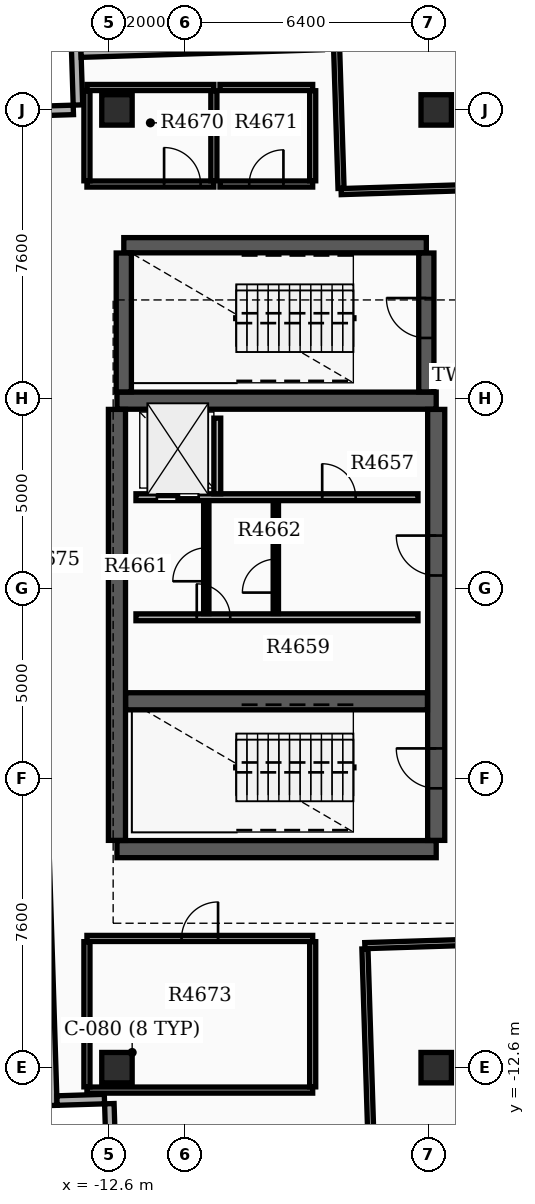
"""IFC4 building model, lengths in metres.
Left out: names, types, materials, properties, quantities, classifications, styles, units other than length and angle.
Written with IfcOpenShell. Run it as: python <this file> out.ifc"""

import sys

from ifc_helpers import new_model, si_unit, direction, frame, frame_2d, origin, origin_2d, place, context, subcontext, project, spatial, rectangle, extrude, element, fill, save


model = new_model("IFC4")
c1 = context("Model", 3, precision=1e-05, world=origin(), true_north=direction((0.0, 1.0)))
c2 = subcontext(c1, "Body", "Model", "MODEL_VIEW")
j1 = project(units=[si_unit("LENGTHUNIT", "METRE"), si_unit("PLANEANGLEUNIT", "RADIAN")], contexts=[c1])
p1 = place(None, origin())
s1 = spatial("IfcSite", under=j1, at=p1, CompositionType="ELEMENT")
p2 = place(p1, origin())
s2 = spatial("IfcBuilding", under=s1, at=p2, CompositionType="ELEMENT")
p3 = place(p2, frame((0.0, 0.0, 299.4)))
s3 = spatial("IfcBuildingStorey", under=s2, at=p3, CompositionType="ELEMENT", Elevation=299.4)
for number, where, z_axis, x_axis in (
    (1, (-12.4, -6.85, 0.0), (0.0, 0.0, 1.0), (1.0, 0.0, 0.0)),
    (2, (-12.4, 4.95, 0.0), (0.0, 0.0, 1.0), (1.0, 0.0, 0.0)),
):
    element("IfcWall", number, at=place(p3, frame(where, z_axis=z_axis, x_axis=x_axis)), inside=s3, PredefinedType="SHEAR", context=c2, shape_type="SweptSolid", body=[
        extrude(rectangle(XDim=8.4, YDim=0.45, at=frame_2d((4.2, 0.0))), origin(), (0.0, 0.0, 1.0), 4.25),
    ])
p4 = place(p3, frame((-12.4, -6.62, 0.0), z_axis=(0.0, 0.0, 1.0), x_axis=(0.0, 1.0, 0.0)))
e3 = element("IfcWall", 3, at=p4, inside=s3, PredefinedType="SHEAR", context=c2, shape_type="SweptSolid", body=[
    extrude(rectangle(XDim=11.34, YDim=0.45, at=frame_2d((5.67, 0.0))), origin(), (0.0, 0.0, 1.0), 4.25),
])
p5 = place(p3, frame((-4.0, -6.62, 0.0), z_axis=(0.0, 0.0, 1.0), x_axis=(0.0, 1.0, 0.0)))
e4 = element("IfcWall", 4, at=p5, inside=s3, PredefinedType="SHEAR", context=c2, shape_type="SweptSolid", body=[
    extrude(rectangle(XDim=11.34, YDim=0.45, at=frame_2d((5.67, 0.0))), origin(), (0.0, 0.0, 1.0), 4.25),
])
p6 = place(p5, frame((1.37, 0.0, 0.0)))
e5 = element("IfcOpeningElement", 5, at=p6, cuts=e4, PredefinedType="OPENING", context=c2, shape_type="SweptSolid", body=[
    extrude(rectangle(XDim=1.05, YDim=2.15, at=frame_2d((0.525, 1.075))), frame((0.0, 0.235, 0.0), z_axis=(0.0, -1.0, 0.0), x_axis=(1.0, 0.0, 0.0)), (0.0, 0.0, 1.0), 0.47),
])
p7 = place(p5, frame((6.97, 0.0, 0.0)))
e6 = element("IfcOpeningElement", 6, at=p7, cuts=e4, PredefinedType="OPENING", context=c2, shape_type="SweptSolid", body=[
    extrude(rectangle(XDim=1.05, YDim=2.15, at=frame_2d((0.525, 1.075))), frame((0.0, 0.235, 0.0), z_axis=(0.0, -1.0, 0.0), x_axis=(1.0, 0.0, 0.0)), (0.0, 0.0, 1.0), 0.47),
])
p8 = place(p3, frame((-12.17, -2.96, 0.0), z_axis=(0.0, 0.0, 1.0), x_axis=(1.0, 0.0, 0.0)))
e7 = element("IfcWall", 7, at=p8, inside=s3, PredefinedType="SHEAR", context=c2, shape_type="SweptSolid", body=[
    extrude(rectangle(XDim=7.94, YDim=0.45, at=frame_2d((3.97, 0.0))), origin(), (0.0, 0.0, 1.0), 4.25),
])
p9 = place(p3, frame((-12.22, 9.04, 0.0), z_axis=(0.0, 0.0, 1.0), x_axis=(1.0, 0.0, 0.0)))
e8 = element("IfcWall", 8, at=p9, inside=s3, PredefinedType="SHEAR", context=c2, shape_type="SweptSolid", body=[
    extrude(rectangle(XDim=7.96, YDim=0.4, at=frame_2d((3.98, 0.0))), origin(), (0.0, 0.0, 1.0), 4.25),
])
p10 = place(p3, frame((-12.22, 5.18, 0.0), z_axis=(0.0, 0.0, 1.0), x_axis=(0.0, 1.0, 0.0)))
e9 = element("IfcWall", 9, at=p10, inside=s3, PredefinedType="SHEAR", context=c2, shape_type="SweptSolid", body=[
    extrude(rectangle(XDim=3.655, YDim=0.4, at=frame_2d((1.828, 0.0))), origin(), (0.0, 0.0, 1.0), 4.25),
])
p11 = place(p3, frame((-4.26, 5.18, 0.0), z_axis=(0.0, 0.0, 1.0), x_axis=(0.0, 1.0, 0.0)))
e10 = element("IfcWall", 10, at=p11, inside=s3, PredefinedType="SHEAR", context=c2, shape_type="SweptSolid", body=[
    extrude(rectangle(XDim=3.655, YDim=0.4, at=frame_2d((1.828, 0.0))), origin(), (0.0, 0.0, 1.0), 4.25),
])
p12 = place(p11, frame((1.42, 0.0, 0.0)))
e11 = element("IfcOpeningElement", 11, at=p12, cuts=e10, PredefinedType="OPENING", context=c2, shape_type="SweptSolid", body=[
    extrude(rectangle(XDim=1.05, YDim=2.15, at=frame_2d((0.525, 1.075))), frame((0.0, 0.21, 0.0), z_axis=(0.0, -1.0, 0.0), x_axis=(1.0, 0.0, 0.0)), (0.0, 0.0, 1.0), 0.42),
])
for number, where, z_axis, x_axis in (
    (12, (-12.4, -12.6, 0.0), (0.0, 0.0, 1.0), (1.0, 0.0, 0.0)),
    (13, (-12.4, 12.6, 0.0), (0.0, 0.0, 1.0), (1.0, 0.0, 0.0)),
    (14, (-4.0, -12.6, 0.0), (0.0, 0.0, 1.0), (1.0, 0.0, 0.0)),
    (15, (-4.0, 12.6, 0.0), (0.0, 0.0, 1.0), (1.0, 0.0, 0.0)),
):
    element("IfcColumn", number, at=place(p3, frame(where, z_axis=z_axis, x_axis=x_axis)), inside=s3, PredefinedType="COLUMN", context=c2, shape_type="SweptSolid", body=[
        extrude(rectangle(XDim=0.8, YDim=0.8, at=origin_2d()), origin(), (0.0, 0.0, 1.0), 4.5),
    ])
p13 = place(p3, frame((-14.797, 12.561, 0.0), z_axis=(0.0, 0.0, 1.0), x_axis=(0.999505383482, 0.0314481858, 0.0)))
e16 = element("IfcWall", 16, at=p13, inside=s3, PredefinedType="STANDARD", context=c2, shape_type="SweptSolid", body=[
    extrude(rectangle(XDim=1.25, YDim=0.25, at=frame_2d((0.625, 0.0))), origin(), (0.0, 0.0, 1.0), 3.73),
])
p14 = place(p3, frame((-13.427, 12.729, 0.0), z_axis=(0.0, 0.0, 1.0), x_axis=(-0.031412596484, 0.999506502621, 0.0)))
e17 = element("IfcWall", 17, at=p14, inside=s3, PredefinedType="STANDARD", context=c2, shape_type="SweptSolid", body=[
    extrude(rectangle(XDim=1.5, YDim=0.25, at=frame_2d((0.75, 0.0))), origin(), (0.0, 0.0, 1.0), 3.73),
])
p15 = place(p3, frame((-13.345, 14.108, 0.0), z_axis=(0.0, 0.0, 1.0), x_axis=(0.999506546651, 0.031411195469, 0.0)))
e18 = element("IfcWall", 18, at=p15, inside=s3, PredefinedType="STANDARD", context=c2, shape_type="SweptSolid", body=[
    extrude(rectangle(XDim=6.35, YDim=0.25, at=frame_2d((3.175, 0.0))), origin(), (0.0, 0.0, 1.0), 3.73),
])
p16 = place(p3, frame((-14.315, -6.748, 0.0), z_axis=(0.0, 0.0, 1.0), x_axis=(0.03143615455, -0.999505761958, 0.0)))
e19 = element("IfcWall", 19, at=p16, inside=s3, PredefinedType="STANDARD", context=c2, shape_type="SweptSolid", body=[
    extrude(rectangle(XDim=6.85, YDim=0.25, at=frame_2d((3.425, 0.0))), origin(), (0.0, 0.0, 1.0), 3.73),
])
p17 = place(p3, frame((-13.979, -13.466, 0.0), z_axis=(0.0, 0.0, 1.0), x_axis=(0.999505576605, 0.031442047252, 0.0)))
e20 = element("IfcWall", 20, at=p17, inside=s3, PredefinedType="STANDARD", context=c2, shape_type="SweptSolid", body=[
    extrude(rectangle(XDim=1.25, YDim=0.25, at=frame_2d((0.625, 0.0))), origin(), (0.0, 0.0, 1.0), 3.73),
])
p18 = place(p3, frame((-12.601, -13.548, 0.0), z_axis=(0.0, 0.0, 1.0), x_axis=(0.031255080879, -0.999511440614, 0.0)))
e21 = element("IfcWall", 21, at=p18, inside=s3, PredefinedType="STANDARD", context=c2, shape_type="SweptSolid", body=[
    extrude(rectangle(XDim=1.5, YDim=0.25, at=frame_2d((0.75, 0.0))), origin(), (0.0, 0.0, 1.0), 3.73),
])
p19 = place(p3, frame((-11.9, 2.41, 0.0), z_axis=(0.0, 0.0, 1.0), x_axis=(1.0, 0.0, 0.0)))
e22 = element("IfcWall", 22, at=p19, inside=s3, PredefinedType="SOLIDWALL", context=c2, shape_type="SweptSolid", body=[
    extrude(rectangle(XDim=7.42, YDim=0.18, at=frame_2d((3.71, 0.0))), origin(), (0.0, 0.0, 1.0), 3.72),
])
p20 = place(p19, frame((0.55, 0.0, 0.0)))
e23 = element("IfcOpeningElement", 23, at=p20, cuts=e22, PredefinedType="OPENING", context=c2, shape_type="SweptSolid", body=[
    extrude(rectangle(XDim=1.1, YDim=2.15, at=frame_2d((0.55, 1.075))), frame((0.0, 0.1, 0.0), z_axis=(0.0, -1.0, 0.0), x_axis=(1.0, 0.0, 0.0)), (0.0, 0.0, 1.0), 0.2),
])
p21 = place(p19, frame((4.9, 0.0, 0.0)))
e24 = element("IfcOpeningElement", 24, at=p21, cuts=e22, PredefinedType="OPENING", context=c2, shape_type="SweptSolid", body=[
    extrude(rectangle(XDim=0.88, YDim=2.1, at=frame_2d((0.44, 1.05))), frame((0.0, 0.1, 0.0), z_axis=(0.0, -1.0, 0.0), x_axis=(1.0, 0.0, 0.0)), (0.0, 0.0, 1.0), 0.2),
])
p22 = place(p3, frame((-11.9, -0.75, 0.0), z_axis=(0.0, 0.0, 1.0), x_axis=(1.0, 0.0, 0.0)))
e25 = element("IfcWall", 25, at=p22, inside=s3, PredefinedType="SOLIDWALL", context=c2, shape_type="SweptSolid", body=[
    extrude(rectangle(XDim=7.42, YDim=0.18, at=frame_2d((3.71, 0.0))), origin(), (0.0, 0.0, 1.0), 3.72),
])
p23 = place(p22, frame((1.6, 0.0, 0.0)))
e26 = element("IfcOpeningElement", 26, at=p23, cuts=e25, PredefinedType="OPENING", context=c2, shape_type="SweptSolid", body=[
    extrude(rectangle(XDim=0.88, YDim=2.1, at=frame_2d((0.44, 1.05))), frame((0.0, 0.1, 0.0), z_axis=(0.0, -1.0, 0.0), x_axis=(1.0, 0.0, 0.0)), (0.0, 0.0, 1.0), 0.2),
])
p24 = place(p3, frame((-9.76, 2.5, 0.0), z_axis=(0.0, 0.0, 1.0), x_axis=(0.0, 1.0, 0.0)))
e27 = element("IfcWall", 27, at=p24, inside=s3, PredefinedType="SOLIDWALL", context=c2, shape_type="SweptSolid", body=[
    extrude(rectangle(XDim=1.99, YDim=0.18, at=frame_2d((0.995, 0.0))), origin(), (0.0, 0.0, 1.0), 3.72),
])
p25 = place(p3, frame((-8.22, -0.65, 0.0), z_axis=(0.0, 0.0, 1.0), x_axis=(0.0, 1.0, 0.0)))
e28 = element("IfcWall", 28, at=p25, inside=s3, PredefinedType="SOLIDWALL", context=c2, shape_type="SweptSolid", body=[
    extrude(rectangle(XDim=2.96, YDim=0.14, at=frame_2d((1.48, 0.0))), origin(), (0.0, 0.0, 1.0), 3.72),
])
p26 = place(p25, frame((0.55, 0.0, 0.0)))
e29 = element("IfcOpeningElement", 29, at=p26, cuts=e28, PredefinedType="OPENING", context=c2, shape_type="SweptSolid", body=[
    extrude(rectangle(XDim=0.88, YDim=2.1, at=frame_2d((0.44, 1.05))), frame((0.0, 0.08, 0.0), z_axis=(0.0, -1.0, 0.0), x_axis=(1.0, 0.0, 0.0)), (0.0, 0.0, 1.0), 0.16),
])
p27 = place(p3, frame((-10.05, -0.652, 0.0), z_axis=(0.0, 0.0, 1.0), x_axis=(0.0, 1.0, 0.0)))
e30 = element("IfcWall", 30, at=p27, inside=s3, PredefinedType="PARTITIONING", context=c2, shape_type="SweptSolid", body=[
    extrude(rectangle(XDim=2.962, YDim=0.14, at=frame_2d((1.481, 0.0))), origin(), (0.0, 0.0, 1.0), 3.72),
])
p28 = place(p27, frame((0.85, 0.0, 0.0)))
e31 = element("IfcOpeningElement", 31, at=p28, cuts=e30, PredefinedType="OPENING", context=c2, shape_type="SweptSolid", body=[
    extrude(rectangle(XDim=0.88, YDim=2.1, at=frame_2d((0.44, 1.05))), frame((0.0, 0.08, 0.0), z_axis=(0.0, -1.0, 0.0), x_axis=(1.0, 0.0, 0.0)), (0.0, 0.0, 1.0), 0.16),
])
p29 = place(p3, frame((-6.501, 10.451, 0.0), z_axis=(0.0, 0.0, 1.0), x_axis=(0.999506967101, 0.031397813872, 0.0)))
e32 = element("IfcWall", 32, at=p29, inside=s3, PredefinedType="PARTITIONING", context=c2, shape_type="SweptSolid", body=[
    extrude(rectangle(XDim=12.34, YDim=0.16, at=frame_2d((6.17, 0.0))), origin(), (0.0, 0.0, 1.0), 3.72),
])
p30 = place(p29, frame((5.42, 0.0, 0.0)))
e33 = element("IfcOpeningElement", 33, at=p30, cuts=e32, PredefinedType="OPENING", context=c2, shape_type="SweptSolid", body=[
    extrude(rectangle(XDim=1.5, YDim=2.15, at=frame_2d((0.75, 1.075))), frame((0.0, 0.09, 0.0), z_axis=(0.0, -1.0, 0.0), x_axis=(1.0, 0.0, 0.0)), (0.0, 0.0, 1.0), 0.18),
])
p31 = place(p3, frame((-6.504, 10.536, 0.0), z_axis=(0.0, 0.0, 1.0), x_axis=(-0.031414008392, 0.999506458247, 0.0)))
e34 = element("IfcWall", 34, at=p31, inside=s3, PredefinedType="PARTITIONING", context=c2, shape_type="SweptSolid", body=[
    extrude(rectangle(XDim=14.712, YDim=0.16, at=frame_2d((7.356, 0.0))), origin(), (0.0, 0.0, 1.0), 3.72),
])
p32 = place(p3, frame((-5.878, -9.389, 0.0), z_axis=(0.0, 0.0, 1.0), x_axis=(0.999506326497, 0.031418200013, 0.0)))
e35 = element("IfcWall", 35, at=p32, inside=s3, PredefinedType="PARTITIONING", context=c2, shape_type="SweptSolid", body=[
    extrude(rectangle(XDim=12.34, YDim=0.16, at=frame_2d((6.17, 0.0))), origin(), (0.0, 0.0, 1.0), 3.72),
])
p33 = place(p32, frame((5.69, 0.0, 0.0)))
e36 = element("IfcOpeningElement", 36, at=p33, cuts=e35, PredefinedType="OPENING", context=c2, shape_type="SweptSolid", body=[
    extrude(rectangle(XDim=0.96, YDim=2.15, at=frame_2d((0.48, 1.075))), frame((0.0, 0.09, 0.0), z_axis=(0.0, -1.0, 0.0), x_axis=(1.0, 0.0, 0.0)), (0.0, 0.0, 1.0), 0.18),
])
p34 = place(p3, frame((-5.368, -25.628, 0.0), z_axis=(0.0, 0.0, 1.0), x_axis=(-0.031404524035, 0.99950675629, 0.0)))
e37 = element("IfcWall", 37, at=p34, inside=s3, PredefinedType="PARTITIONING", context=c2, shape_type="SweptSolid", body=[
    extrude(rectangle(XDim=16.162, YDim=0.16, at=frame_2d((8.081, 0.0))), origin(), (0.0, 0.0, 1.0), 3.72),
])
p35 = place(p3, frame((-13.19, 10.65, 0.0), z_axis=(0.0, 0.0, 1.0), x_axis=(1.0, 0.0, 0.0)))
e38 = element("IfcWall", 38, at=p35, inside=s3, PredefinedType="PARTITIONING", context=c2, shape_type="SweptSolid", body=[
    extrude(rectangle(XDim=3.34, YDim=0.16, at=frame_2d((1.67, 0.0))), origin(), (0.0, 0.0, 1.0), 3.72),
])
p36 = place(p35, frame((2.03, 0.0, 0.0)))
e39 = element("IfcOpeningElement", 39, at=p36, cuts=e38, PredefinedType="OPENING", context=c2, shape_type="SweptSolid", body=[
    extrude(rectangle(XDim=0.96, YDim=2.15, at=frame_2d((0.48, 1.075))), frame((0.0, 0.09, 0.0), z_axis=(0.0, -1.0, 0.0), x_axis=(1.0, 0.0, 0.0)), (0.0, 0.0, 1.0), 0.18),
])
p37 = place(p3, frame((-13.19, 13.19, 0.0), z_axis=(0.0, 0.0, 1.0), x_axis=(1.0, 0.0, 0.0)))
e40 = element("IfcWall", 40, at=p37, inside=s3, PredefinedType="PARTITIONING", context=c2, shape_type="SweptSolid", body=[
    extrude(rectangle(XDim=3.34, YDim=0.16, at=frame_2d((1.67, 0.0))), origin(), (0.0, 0.0, 1.0), 3.72),
])
for number, where, z_axis, x_axis in (
    (41, (-13.19, 10.735, 0.0), (0.0, 0.0, 1.0), (0.0, 1.0, 0.0)),
    (42, (-9.85, 10.735, 0.0), (0.0, 0.0, 1.0), (0.0, 1.0, 0.0)),
):
    element("IfcWall", number, at=place(p3, frame(where, z_axis=z_axis, x_axis=x_axis)), inside=s3, PredefinedType="PARTITIONING", context=c2, shape_type="SweptSolid", body=[
        extrude(rectangle(XDim=2.37, YDim=0.16, at=frame_2d((1.185, 0.0))), origin(), (0.0, 0.0, 1.0), 3.72),
    ])
p38 = place(p3, frame((-9.69, 10.65, 0.0), z_axis=(0.0, 0.0, 1.0), x_axis=(1.0, 0.0, 0.0)))
e43 = element("IfcWall", 43, at=p38, inside=s3, PredefinedType="PARTITIONING", context=c2, shape_type="SweptSolid", body=[
    extrude(rectangle(XDim=2.44, YDim=0.16, at=frame_2d((1.22, 0.0))), origin(), (0.0, 0.0, 1.0), 3.72),
])
p39 = place(p38, frame((0.77, 0.0, 0.0)))
e44 = element("IfcOpeningElement", 44, at=p39, cuts=e43, PredefinedType="OPENING", context=c2, shape_type="SweptSolid", body=[
    extrude(rectangle(XDim=0.9, YDim=2.15, at=frame_2d((0.45, 1.075))), frame((0.0, 0.09, 0.0), z_axis=(0.0, -1.0, 0.0), x_axis=(1.0, 0.0, 0.0)), (0.0, 0.0, 1.0), 0.18),
])
p40 = place(p3, frame((-9.69, 13.19, 0.0), z_axis=(0.0, 0.0, 1.0), x_axis=(1.0, 0.0, 0.0)))
e45 = element("IfcWall", 45, at=p40, inside=s3, PredefinedType="PARTITIONING", context=c2, shape_type="SweptSolid", body=[
    extrude(rectangle(XDim=2.44, YDim=0.16, at=frame_2d((1.22, 0.0))), origin(), (0.0, 0.0, 1.0), 3.72),
])
p41 = place(p3, frame((-7.25, 10.735, 0.0), z_axis=(0.0, 0.0, 1.0), x_axis=(0.0, 1.0, 0.0)))
e46 = element("IfcWall", 46, at=p41, inside=s3, PredefinedType="PARTITIONING", context=c2, shape_type="SweptSolid", body=[
    extrude(rectangle(XDim=2.37, YDim=0.16, at=frame_2d((1.185, 0.0))), origin(), (0.0, 0.0, 1.0), 3.72),
])
p42 = place(p3, frame((-13.19, -13.19, 0.0), z_axis=(0.0, 0.0, 1.0), x_axis=(1.0, 0.0, 0.0)))
e47 = element("IfcWall", 47, at=p42, inside=s3, PredefinedType="PARTITIONING", context=c2, shape_type="SweptSolid", body=[
    extrude(rectangle(XDim=5.94, YDim=0.16, at=frame_2d((2.97, 0.0))), origin(), (0.0, 0.0, 1.0), 3.72),
])
p43 = place(p3, frame((-13.19, -9.2, 0.0), z_axis=(0.0, 0.0, 1.0), x_axis=(1.0, 0.0, 0.0)))
e48 = element("IfcWall", 48, at=p43, inside=s3, PredefinedType="PARTITIONING", context=c2, shape_type="SweptSolid", body=[
    extrude(rectangle(XDim=5.94, YDim=0.16, at=frame_2d((2.97, 0.0))), origin(), (0.0, 0.0, 1.0), 3.72),
])
p44 = place(p43, frame((2.49, 0.0, 0.0)))
e49 = element("IfcOpeningElement", 49, at=p44, cuts=e48, PredefinedType="OPENING", context=c2, shape_type="SweptSolid", body=[
    extrude(rectangle(XDim=0.96, YDim=2.15, at=frame_2d((0.48, 1.075))), frame((0.0, 0.09, 0.0), z_axis=(0.0, -1.0, 0.0), x_axis=(1.0, 0.0, 0.0)), (0.0, 0.0, 1.0), 0.18),
])
for number, where, z_axis, x_axis in (
    (50, (-13.19, -13.105, 0.0), (0.0, 0.0, 1.0), (0.0, 1.0, 0.0)),
    (51, (-7.25, -13.105, 0.0), (0.0, 0.0, 1.0), (0.0, 1.0, 0.0)),
):
    element("IfcWall", number, at=place(p3, frame(where, z_axis=z_axis, x_axis=x_axis)), inside=s3, PredefinedType="PARTITIONING", context=c2, shape_type="SweptSolid", body=[
        extrude(rectangle(XDim=3.82, YDim=0.16, at=frame_2d((1.91, 0.0))), origin(), (0.0, 0.0, 1.0), 3.72),
    ])
p45 = place(p6, origin())
e52 = element("IfcDoor", 52, at=p45, inside=s3, OperationType="SINGLE_SWING_RIGHT", PredefinedType="DOOR", context=c2, shape_type="SweptSolid", body=[
    extrude(rectangle(XDim=1.05, YDim=2.15, at=frame_2d((0.525, 1.075))), frame((0.0, 0.025, 0.0), z_axis=(0.0, -1.0, 0.0), x_axis=(1.0, 0.0, 0.0)), (0.0, 0.0, 1.0), 0.05),
])
fill(e5, e52)
p46 = place(p7, origin())
e53 = element("IfcDoor", 53, at=p46, inside=s3, OperationType="SINGLE_SWING_RIGHT", PredefinedType="DOOR", context=c2, shape_type="SweptSolid", body=[
    extrude(rectangle(XDim=1.05, YDim=2.15, at=frame_2d((0.525, 1.075))), frame((0.0, 0.025, 0.0), z_axis=(0.0, -1.0, 0.0), x_axis=(1.0, 0.0, 0.0)), (0.0, 0.0, 1.0), 0.05),
])
fill(e6, e53)
p47 = place(p12, origin())
e54 = element("IfcDoor", 54, at=p47, inside=s3, OperationType="SINGLE_SWING_RIGHT", PredefinedType="DOOR", context=c2, shape_type="SweptSolid", body=[
    extrude(rectangle(XDim=1.05, YDim=2.15, at=frame_2d((0.525, 1.075))), frame((0.0, 0.025, 0.0), z_axis=(0.0, -1.0, 0.0), x_axis=(1.0, 0.0, 0.0)), (0.0, 0.0, 1.0), 0.05),
])
fill(e11, e54)
p48 = place(p20, origin())
e55 = element("IfcDoor", 55, at=p48, inside=s3, OperationType="DOUBLE_DOOR_SLIDING", PredefinedType="DOOR", context=c2, shape_type="SweptSolid", body=[
    extrude(rectangle(XDim=1.1, YDim=2.15, at=frame_2d((0.55, 1.075))), frame((0.0, 0.025, 0.0), z_axis=(0.0, -1.0, 0.0), x_axis=(1.0, 0.0, 0.0)), (0.0, 0.0, 1.0), 0.05),
])
fill(e23, e55)
p49 = place(p21, origin())
e56 = element("IfcDoor", 56, at=p49, inside=s3, OperationType="SINGLE_SWING_LEFT", PredefinedType="DOOR", context=c2, shape_type="SweptSolid", body=[
    extrude(rectangle(XDim=0.88, YDim=2.1, at=frame_2d((0.44, 1.05))), frame((0.0, 0.025, 0.0), z_axis=(0.0, -1.0, 0.0), x_axis=(1.0, 0.0, 0.0)), (0.0, 0.0, 1.0), 0.05),
])
fill(e24, e56)
p50 = place(p23, origin())
e57 = element("IfcDoor", 57, at=p50, inside=s3, OperationType="SINGLE_SWING_LEFT", PredefinedType="DOOR", context=c2, shape_type="SweptSolid", body=[
    extrude(rectangle(XDim=0.88, YDim=2.1, at=frame_2d((0.44, 1.05))), frame((0.0, 0.025, 0.0), z_axis=(0.0, -1.0, 0.0), x_axis=(1.0, 0.0, 0.0)), (0.0, 0.0, 1.0), 0.05),
])
fill(e26, e57)
p51 = place(p26, origin())
e58 = element("IfcDoor", 58, at=p51, inside=s3, OperationType="SINGLE_SWING_LEFT", PredefinedType="DOOR", context=c2, shape_type="SweptSolid", body=[
    extrude(rectangle(XDim=0.88, YDim=2.1, at=frame_2d((0.44, 1.05))), frame((0.0, 0.025, 0.0), z_axis=(0.0, -1.0, 0.0), x_axis=(1.0, 0.0, 0.0)), (0.0, 0.0, 1.0), 0.05),
])
fill(e29, e58)
p52 = place(p28, origin())
e59 = element("IfcDoor", 59, at=p52, inside=s3, OperationType="SINGLE_SWING_LEFT", PredefinedType="DOOR", context=c2, shape_type="SweptSolid", body=[
    extrude(rectangle(XDim=0.88, YDim=2.1, at=frame_2d((0.44, 1.05))), frame((0.0, 0.025, 0.0), z_axis=(0.0, -1.0, 0.0), x_axis=(1.0, 0.0, 0.0)), (0.0, 0.0, 1.0), 0.05),
])
fill(e31, e59)
p53 = place(p36, origin())
e60 = element("IfcDoor", 60, at=p53, inside=s3, OperationType="SINGLE_SWING_LEFT", PredefinedType="DOOR", context=c2, shape_type="SweptSolid", body=[
    extrude(rectangle(XDim=0.96, YDim=2.15, at=frame_2d((0.48, 1.075))), frame((0.0, 0.025, 0.0), z_axis=(0.0, -1.0, 0.0), x_axis=(1.0, 0.0, 0.0)), (0.0, 0.0, 1.0), 0.05),
])
fill(e39, e60)
p54 = place(p39, origin())
e61 = element("IfcDoor", 61, at=p54, inside=s3, OperationType="SINGLE_SWING_RIGHT", PredefinedType="DOOR", context=c2, shape_type="SweptSolid", body=[
    extrude(rectangle(XDim=0.9, YDim=2.15, at=frame_2d((0.45, 1.075))), frame((0.0, 0.025, 0.0), z_axis=(0.0, -1.0, 0.0), x_axis=(1.0, 0.0, 0.0)), (0.0, 0.0, 1.0), 0.05),
])
fill(e44, e61)
p55 = place(p44, origin())
e62 = element("IfcDoor", 62, at=p55, inside=s3, OperationType="SINGLE_SWING_RIGHT", PredefinedType="DOOR", context=c2, shape_type="SweptSolid", body=[
    extrude(rectangle(XDim=0.96, YDim=2.15, at=frame_2d((0.48, 1.075))), frame((0.0, 0.025, 0.0), z_axis=(0.0, -1.0, 0.0), x_axis=(1.0, 0.0, 0.0)), (0.0, 0.0, 1.0), 0.05),
])
fill(e49, e62)
save(model, sys.argv[1])
